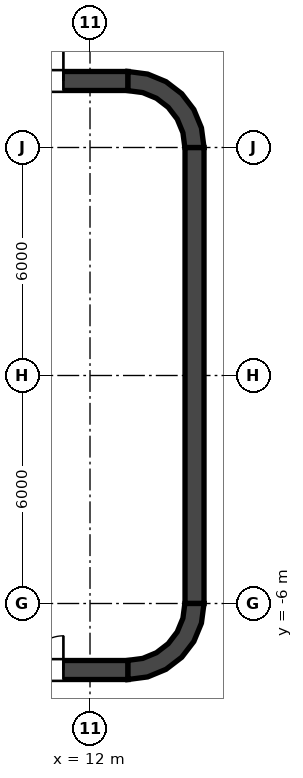
"""IFC4 building model, lengths in metres.
Left out: names, types, materials, properties, quantities, classifications, styles, units other than length and angle.
Written with IfcOpenShell. Run it as: python <this file> out.ifc"""

import sys

from ifc_helpers import new_model, si_unit, direction, frame, frame_2d, origin, place, context, subcontext, project, spatial, polyline, rectangle, outline, extrude, element, fill, save


model = new_model("IFC4")
c1 = context("Model", 3, precision=1e-05, world=origin(), true_north=direction((0.0, 1.0)))
c2 = subcontext(c1, "Body", "Model", "MODEL_VIEW")
j1 = project(units=[si_unit("LENGTHUNIT", "METRE"), si_unit("PLANEANGLEUNIT", "RADIAN")], contexts=[c1])
p1 = place(None, origin())
s1 = spatial("IfcSite", under=j1, at=p1, CompositionType="ELEMENT")
p2 = place(p1, origin())
s2 = spatial("IfcBuilding", under=s1, at=p2, CompositionType="ELEMENT")
p3 = place(p2, frame((0.0, 0.0, 197.6)))
s3 = spatial("IfcBuildingStorey", under=s2, at=p3, CompositionType="ELEMENT", Elevation=197.6)
p4 = place(p3, frame((-13.0, 7.75, 0.0), z_axis=(0.0, 0.0, 1.0), x_axis=(1.0, 0.0, 0.0)))
e1 = element("IfcWall", 1, at=p4, inside=s3, PredefinedType="SHEAR", context=c2, shape_type="SweptSolid", body=[
    extrude(rectangle(XDim=26.0, YDim=0.5, at=frame_2d((13.0, 0.0))), origin(), (0.0, 0.0, 1.0), 5.4),
])
p5 = place(p4, frame((1.7, 0.0, 0.0)))
e2 = element("IfcOpeningElement", 2, at=p5, cuts=e1, PredefinedType="OPENING", context=c2, shape_type="SweptSolid", body=[
    extrude(rectangle(XDim=1.8, YDim=2.1, at=frame_2d((0.9, 1.05))), frame((0.0, 0.25, 0.0), z_axis=(0.0, -1.0, 0.0), x_axis=(1.0, 0.0, 0.0)), (0.0, 0.0, 1.0), 0.5),
])
p6 = place(p4, frame((22.5, 0.0, 0.0)))
e3 = element("IfcOpeningElement", 3, at=p6, cuts=e1, PredefinedType="OPENING", context=c2, shape_type="SweptSolid", body=[
    extrude(rectangle(XDim=1.8, YDim=2.1, at=frame_2d((0.9, 1.05))), frame((0.0, 0.25, 0.0), z_axis=(0.0, -1.0, 0.0), x_axis=(1.0, 0.0, 0.0)), (0.0, 0.0, 1.0), 0.5),
])
p7 = place(p3, frame((-13.0, -7.75, 0.0), z_axis=(0.0, 0.0, 1.0), x_axis=(1.0, 0.0, 0.0)))
e4 = element("IfcWall", 4, at=p7, inside=s3, PredefinedType="SHEAR", context=c2, shape_type="SweptSolid", body=[
    extrude(rectangle(XDim=26.0, YDim=0.5, at=frame_2d((13.0, 0.0))), origin(), (0.0, 0.0, 1.0), 5.4),
])
p8 = place(p7, frame((1.7, 0.0, 0.0)))
e5 = element("IfcOpeningElement", 5, at=p8, cuts=e4, PredefinedType="OPENING", context=c2, shape_type="SweptSolid", body=[
    extrude(rectangle(XDim=1.8, YDim=2.1, at=frame_2d((0.9, 1.05))), frame((0.0, 0.25, 0.0), z_axis=(0.0, -1.0, 0.0), x_axis=(1.0, 0.0, 0.0)), (0.0, 0.0, 1.0), 0.5),
])
p9 = place(p7, frame((22.5, 0.0, 0.0)))
e6 = element("IfcOpeningElement", 6, at=p9, cuts=e4, PredefinedType="OPENING", context=c2, shape_type="SweptSolid", body=[
    extrude(rectangle(XDim=1.8, YDim=2.1, at=frame_2d((0.9, 1.05))), frame((0.0, 0.25, 0.0), z_axis=(0.0, -1.0, 0.0), x_axis=(1.0, 0.0, 0.0)), (0.0, 0.0, 1.0), 0.5),
])
p10 = place(p3, frame((14.75, -6.0, 0.0), z_axis=(0.0, 0.0, 1.0), x_axis=(0.0, 1.0, 0.0)))
e7 = element("IfcWall", 7, at=p10, inside=s3, PredefinedType="SHEAR", context=c2, shape_type="SweptSolid", body=[
    extrude(rectangle(XDim=12.0, YDim=0.5, at=frame_2d((6.0, 0.0))), origin(), (0.0, 0.0, 1.0), 5.4),
])
p11 = place(p3, origin())
e8 = element("IfcWall", 8, at=p11, inside=s3, PredefinedType="SHEAR", context=c2, shape_type="SweptSolid", body=[
    extrude(outline(polyline([(13.0, 8.0), (13.0, 7.496), (13.387, 7.445), (13.748, 7.295), (14.058, 7.058), (14.295, 6.748), (14.445, 6.387), (14.496, 6.0), (15.0, 6.0), (14.932, 6.518), (14.732, 7.0), (14.414, 7.414), (14.0, 7.732), (13.518, 7.932), (13.0, 8.0)])), origin(), (0.0, 0.0, 1.0), 5.4),
])
e9 = element("IfcWall", 9, at=p11, inside=s3, PredefinedType="SHEAR", context=c2, shape_type="SweptSolid", body=[
    extrude(outline(polyline([(15.0, -6.0), (14.496, -6.0), (14.445, -6.387), (14.295, -6.748), (14.058, -7.058), (13.748, -7.295), (13.387, -7.445), (13.0, -7.496), (13.0, -8.0), (13.518, -7.932), (14.0, -7.732), (14.414, -7.414), (14.732, -7.0), (14.932, -6.518), (15.0, -6.0)])), origin(), (0.0, 0.0, 1.0), 5.4),
])
p12 = place(p3, frame((11.8, -7.5, 0.0), z_axis=(0.0, 0.0, 1.0), x_axis=(0.0, 1.0, 0.0)))
e10 = element("IfcWall", 10, at=p12, inside=s3, PredefinedType="SOLIDWALL", context=c2, shape_type="SweptSolid", body=[
    extrude(rectangle(XDim=15.0, YDim=0.4, at=frame_2d((7.5, 0.0))), origin(), (0.0, 0.0, 1.0), 5.2),
])
p13 = place(p12, frame((13.697, 0.0, 0.0)))
e11 = element("IfcOpeningElement", 11, at=p13, cuts=e10, PredefinedType="OPENING", context=c2, shape_type="SweptSolid", body=[
    extrude(rectangle(XDim=0.9, YDim=2.1, at=frame_2d((0.45, 1.05))), frame((0.0, 0.2, 0.0), z_axis=(0.0, -1.0, 0.0), x_axis=(1.0, 0.0, 0.0)), (0.0, 0.0, 1.0), 0.4),
])
p14 = place(p12, frame((0.403, 0.0, 0.0)))
e12 = element("IfcOpeningElement", 12, at=p14, cuts=e10, PredefinedType="OPENING", context=c2, shape_type="SweptSolid", body=[
    extrude(rectangle(XDim=0.9, YDim=2.1, at=frame_2d((0.45, 1.05))), frame((0.0, 0.2, 0.0), z_axis=(0.0, -1.0, 0.0), x_axis=(1.0, 0.0, 0.0)), (0.0, 0.0, 1.0), 0.4),
])
e13 = element("IfcWall", 13, at=p11, inside=s3, PredefinedType="SOLIDWALL", context=c2, shape_type="SweptSolid", body=[
    extrude(outline(polyline([(12.0, -5.675), (12.0, -5.925), (14.25, -5.925), (14.5, -5.925), (14.5, -5.675), (14.5, -3.025), (14.5, -2.775), (14.5, -0.125), (14.5, 0.125), (14.5, 2.775), (14.5, 3.025), (14.5, 5.675), (14.5, 5.925), (14.25, 5.925), (12.0, 5.925), (12.0, 5.675), (14.25, 5.675), (14.25, 3.025), (12.0, 3.025), (12.0, 2.775), (14.25, 2.775), (14.25, 0.125), (12.0, 0.125), (12.0, -0.125), (14.25, -0.125), (14.25, -2.775), (12.0, -2.775), (12.0, -3.025), (14.25, -3.025), (14.25, -5.675), (12.0, -5.675)])), origin(), (0.0, 0.0, 1.0), 5.2),
])
p15 = place(p13, origin())
e14 = element("IfcDoor", 14, at=p15, inside=s3, OperationType="SINGLE_SWING_RIGHT", PredefinedType="DOOR", context=c2, shape_type="SweptSolid", body=[
    extrude(rectangle(XDim=0.9, YDim=2.1, at=frame_2d((0.45, 1.05))), frame((0.0, 0.025, 0.0), z_axis=(0.0, -1.0, 0.0), x_axis=(1.0, 0.0, 0.0)), (0.0, 0.0, 1.0), 0.05),
])
fill(e11, e14)
p16 = place(p14, origin())
e15 = element("IfcDoor", 15, at=p16, inside=s3, OperationType="SINGLE_SWING_RIGHT", PredefinedType="DOOR", context=c2, shape_type="SweptSolid", body=[
    extrude(rectangle(XDim=0.9, YDim=2.1, at=frame_2d((0.45, 1.05))), frame((0.0, 0.025, 0.0), z_axis=(0.0, -1.0, 0.0), x_axis=(1.0, 0.0, 0.0)), (0.0, 0.0, 1.0), 0.05),
])
fill(e12, e15)
p17 = place(p6, origin())
e16 = element("IfcDoor", 16, at=p17, inside=s3, OperationType="DOUBLE_DOOR_SINGLE_SWING", PredefinedType="DOOR", context=c2, shape_type="SweptSolid", body=[
    extrude(rectangle(XDim=1.8, YDim=2.1, at=frame_2d((0.9, 1.05))), frame((0.0, 0.025, 0.0), z_axis=(0.0, -1.0, 0.0), x_axis=(1.0, 0.0, 0.0)), (0.0, 0.0, 1.0), 0.05),
])
fill(e3, e16)
p18 = place(p9, origin())
e17 = element("IfcDoor", 17, at=p18, inside=s3, OperationType="DOUBLE_DOOR_SINGLE_SWING", PredefinedType="DOOR", context=c2, shape_type="SweptSolid", body=[
    extrude(rectangle(XDim=1.8, YDim=2.1, at=frame_2d((0.9, 1.05))), frame((0.0, 0.025, 0.0), z_axis=(0.0, -1.0, 0.0), x_axis=(1.0, 0.0, 0.0)), (0.0, 0.0, 1.0), 0.05),
])
fill(e6, e17)
save(model, sys.argv[1])
